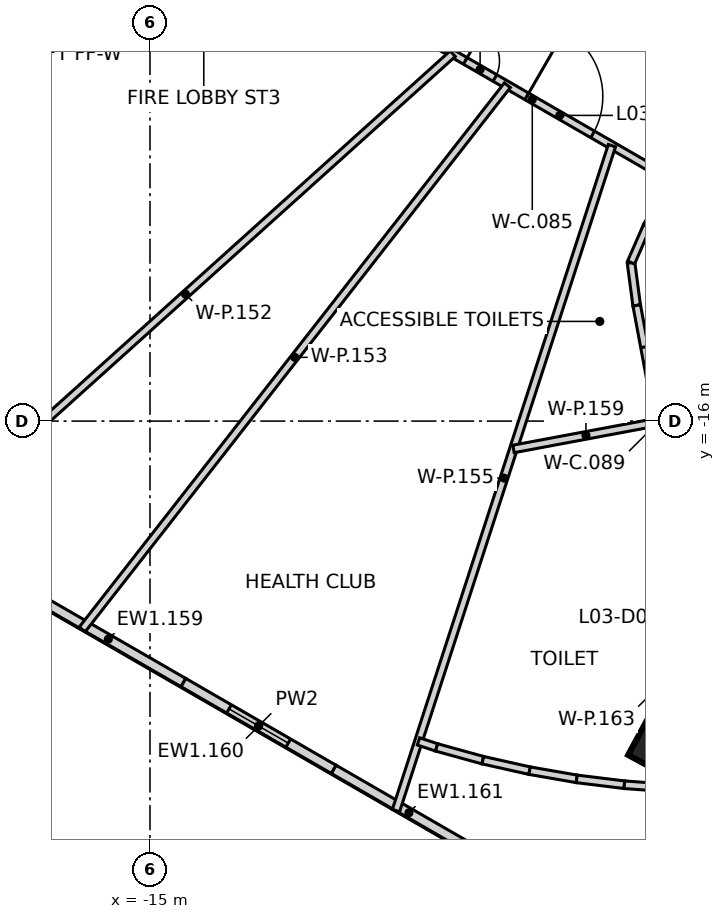
"""IFC4 building model, lengths in metres.
Left out: names, types, materials, properties, quantities, classifications, styles, units other than length and angle.
Written with IfcOpenShell. Run it as: python <this file> out.ifc"""

import sys

from ifc_helpers import new_model, si_unit, direction, frame, frame_2d, origin, origin_2d, place, context, subcontext, project, spatial, rectangle, extrude, element, fill, save


model = new_model("IFC4")
c1 = context("Model", 3, precision=1e-05, world=origin(), true_north=direction((0.0, 1.0)))
c2 = subcontext(c1, "Body", "Model", "MODEL_VIEW")
j1 = project(units=[si_unit("LENGTHUNIT", "METRE"), si_unit("PLANEANGLEUNIT", "RADIAN")], contexts=[c1])
p1 = place(None, origin())
s1 = spatial("IfcSite", under=j1, at=p1, CompositionType="ELEMENT")
p2 = place(p1, origin())
s2 = spatial("IfcBuilding", under=s1, at=p2, CompositionType="ELEMENT")
p3 = place(p2, frame((0.0, 0.0, 19.5)))
s3 = spatial("IfcBuildingStorey", under=s2, at=p3, CompositionType="ELEMENT", Elevation=19.5)
p4 = place(p3, frame((-1.197, -24.423, -0.35), z_axis=(0.0, 0.0, 1.0), x_axis=(0.476198301069, 0.879337920289, 0.0)))
e1 = element("IfcColumn", 1, at=p4, inside=s3, PredefinedType="COLUMN", context=c2, shape_type="SweptSolid", body=[
    extrude(rectangle(XDim=1.8, YDim=1.8, at=origin_2d()), origin(), (0.0, 0.0, 1.0), 2.5),
])
p5 = place(p3, frame((-14.119, -22.881, 0.0), z_axis=(0.0, 0.0, 1.0), x_axis=(-0.866023543838, 0.500003221507, 0.0)))
e2 = element("IfcWall", 2, at=p5, inside=s3, PredefinedType="SOLIDWALL", context=c2, shape_type="SweptSolid", body=[
    extrude(rectangle(XDim=4.566, YDim=0.25, at=frame_2d((2.283, 0.0))), origin(), (0.0, 0.0, 1.0), 4.55),
])
p6 = place(p3, frame((-10.165, -25.164, 0.0), z_axis=(0.0, 0.0, 1.0), x_axis=(-0.866023543838, 0.500003221507, 0.0)))
e3 = element("IfcWall", 3, at=p6, inside=s3, PredefinedType="SOLIDWALL", context=c2, shape_type="SweptSolid", body=[
    extrude(rectangle(XDim=4.566, YDim=0.25, at=frame_2d((2.283, 0.0))), origin(), (0.0, 0.0, 1.0), 4.55),
])
p7 = place(p6, frame((1.383, 0.0, 1.1)))
e4 = element("IfcOpeningElement", 4, at=p7, cuts=e3, PredefinedType="OPENING", context=c2, shape_type="SweptSolid", body=[
    extrude(rectangle(XDim=1.8, YDim=1.5, at=frame_2d((0.9, 0.75))), frame((0.0, 0.135, 0.0), z_axis=(0.0, -1.0, 0.0), x_axis=(1.0, 0.0, 0.0)), (0.0, 0.0, 1.0), 0.27),
])
p8 = place(p3, frame((-6.21, -27.447, 0.0), z_axis=(0.0, 0.0, 1.0), x_axis=(-0.866046694585, 0.499963121439, 0.0)))
e5 = element("IfcWall", 5, at=p8, inside=s3, PredefinedType="SOLIDWALL", context=c2, shape_type="SweptSolid", body=[
    extrude(rectangle(XDim=4.566, YDim=0.25, at=frame_2d((2.283, 0.0))), origin(), (0.0, 0.0, 1.0), 4.55),
])
p9 = place(p3, frame((-8.636, -5.407, 0.0), z_axis=(0.0, 0.0, 1.0), x_axis=(0.86608314541, -0.499899975231, 0.0)))
e6 = element("IfcWall", 6, at=p9, inside=s3, PredefinedType="PARTITIONING", context=c2, shape_type="SweptSolid", body=[
    extrude(rectangle(XDim=8.532, YDim=0.2, at=frame_2d((4.266, 0.0))), origin(), (0.0, 0.0, 1.0), 4.55),
])
p10 = place(p9, frame((2.231, 0.0, 0.0)))
e7 = element("IfcOpeningElement", 7, at=p10, cuts=e6, PredefinedType="OPENING", context=c2, shape_type="SweptSolid", body=[
    extrude(rectangle(XDim=0.9, YDim=2.1, at=frame_2d((0.45, 1.05))), frame((0.0, 0.11, 0.0), z_axis=(0.0, -1.0, 0.0), x_axis=(1.0, 0.0, 0.0)), (0.0, 0.0, 1.0), 0.22),
])
p11 = place(p9, frame((4.101, 0.0, 0.0)))
e8 = element("IfcOpeningElement", 8, at=p11, cuts=e6, PredefinedType="OPENING", context=c2, shape_type="SweptSolid", body=[
    extrude(rectangle(XDim=2.0, YDim=2.1, at=frame_2d((1.0, 1.05))), frame((0.0, 0.11, 0.0), z_axis=(0.0, -1.0, 0.0), x_axis=(1.0, 0.0, 0.0)), (0.0, 0.0, 1.0), 0.22),
])
p12 = place(p3, frame((-2.342, -11.835, 0.0), z_axis=(0.0, 0.0, 1.0), x_axis=(0.130834272089, -0.991404253192, 0.0)))
e9 = element("IfcWall", 9, at=p12, inside=s3, PredefinedType="PARTITIONING", context=c2, shape_type="SweptSolid", body=[
    extrude(rectangle(XDim=1.131, YDim=0.2, at=frame_2d((0.565, 0.0))), origin(), (0.0, 0.0, 1.0), 4.55),
])
p13 = place(p3, frame((-2.341, -11.827, 0.0), z_axis=(0.0, 0.0, 1.0), x_axis=(0.400116595296, 0.916464243803, 0.0)))
e10 = element("IfcWall", 10, at=p13, inside=s3, PredefinedType="PARTITIONING", context=c2, shape_type="SweptSolid", body=[
    extrude(rectangle(XDim=1.04, YDim=0.2, at=frame_2d((0.52, 0.0))), origin(), (0.0, 0.0, 1.0), 4.55),
])
p14 = place(p3, frame((-2.193, -12.956, 0.0), z_axis=(0.0, 0.0, 1.0), x_axis=(0.183666249042, -0.982988661665, 0.0)))
e11 = element("IfcWall", 11, at=p14, inside=s3, PredefinedType="PARTITIONING", context=c2, shape_type="SweptSolid", body=[
    extrude(rectangle(XDim=6.23, YDim=0.2, at=frame_2d((3.115, 0.0))), origin(), (0.0, 0.0, 1.0), 4.55),
])
p15 = place(p14, frame((4.268, 0.0, 0.0)))
e12 = element("IfcOpeningElement", 12, at=p15, cuts=e11, PredefinedType="OPENING", context=c2, shape_type="SweptSolid", body=[
    extrude(rectangle(XDim=0.8, YDim=2.1, at=frame_2d((0.4, 1.05))), frame((0.0, 0.11, 0.0), z_axis=(0.0, -1.0, 0.0), x_axis=(1.0, 0.0, 0.0)), (0.0, 0.0, 1.0), 0.22),
])
p16 = place(p14, frame((1.114, 0.0, 0.0)))
e13 = element("IfcOpeningElement", 13, at=p16, cuts=e11, PredefinedType="OPENING", context=c2, shape_type="SweptSolid", body=[
    extrude(rectangle(XDim=0.9, YDim=2.1, at=frame_2d((0.45, 1.05))), frame((0.0, 0.11, 0.0), z_axis=(0.0, -1.0, 0.0), x_axis=(1.0, 0.0, 0.0)), (0.0, 0.0, 1.0), 0.22),
])
p17 = place(p3, frame((-1.924, -10.869, 0.0), z_axis=(0.0, 0.0, 1.0), x_axis=(0.499136241111, 0.866523521209, 0.0)))
e14 = element("IfcWall", 14, at=p17, inside=s3, PredefinedType="PARTITIONING", context=c2, shape_type="SweptSolid", body=[
    extrude(rectangle(XDim=1.358, YDim=0.2, at=frame_2d((0.679, 0.0))), origin(), (0.0, 0.0, 1.0), 4.55),
])
p18 = place(p3, frame((-21.094, -18.993, 0.0), z_axis=(0.0, 0.0, 1.0), x_axis=(0.743122161884, 0.669155775972, 0.0)))
e15 = element("IfcWall", 15, at=p18, inside=s3, PredefinedType="PARTITIONING", context=c2, shape_type="SweptSolid", body=[
    extrude(rectangle(XDim=18.92, YDim=0.2, at=frame_2d((9.46, 0.0))), origin(), (0.0, 0.0, 1.0), 2.15),
])
p19 = place(p3, frame((-16.783, -21.481, 0.0), z_axis=(0.0, 0.0, 1.0), x_axis=(0.615637784037, 0.788029262696, 0.0)))
e16 = element("IfcWall", 16, at=p19, inside=s3, PredefinedType="PARTITIONING", context=c2, shape_type="SweptSolid", body=[
    extrude(rectangle(XDim=18.17, YDim=0.2, at=frame_2d((9.085, 0.0))), origin(), (0.0, 0.0, 1.0), 2.15),
])
p20 = place(p3, frame((-8.528, -26.248, 0.0), z_axis=(0.0, 0.0, 1.0), x_axis=(0.308912004648, 0.951090623119, 0.0)))
e17 = element("IfcWall", 17, at=p20, inside=s3, PredefinedType="PARTITIONING", context=c2, shape_type="SweptSolid", body=[
    extrude(rectangle(XDim=18.395, YDim=0.2, at=frame_2d((9.197, 0.0))), origin(), (0.0, 0.0, 1.0), 2.15),
])
p21 = place(p3, frame((-7.935, -24.428, 0.0), z_axis=(0.0, 0.0, 1.0), x_axis=(0.949312985708, -0.314332395984, 0.0)))
e18 = element("IfcWall", 18, at=p21, inside=s3, PredefinedType="PARTITIONING", context=c2, shape_type="SweptSolid", body=[
    extrude(rectangle(XDim=0.502, YDim=0.2, at=frame_2d((0.251, 0.0))), origin(), (0.0, 0.0, 1.0), 4.55),
])
p22 = place(p3, frame((-7.458, -24.586, 0.0), z_axis=(0.0, 0.0, 1.0), x_axis=(0.96379206232, -0.266654946718, 0.0)))
e19 = element("IfcWall", 19, at=p22, inside=s3, PredefinedType="PARTITIONING", context=c2, shape_type="SweptSolid", body=[
    extrude(rectangle(XDim=1.261, YDim=0.2, at=frame_2d((0.63, 0.0))), origin(), (0.0, 0.0, 1.0), 4.55),
])
p23 = place(p3, frame((-6.243, -24.922, 0.0), z_axis=(0.0, 0.0, 1.0), x_axis=(0.975793849567, -0.218692393893, 0.0)))
e20 = element("IfcWall", 20, at=p23, inside=s3, PredefinedType="PARTITIONING", context=c2, shape_type="SweptSolid", body=[
    extrude(rectangle(XDim=1.261, YDim=0.2, at=frame_2d((0.631, 0.0))), origin(), (0.0, 0.0, 1.0), 4.55),
])
p24 = place(p3, frame((-5.435, -16.733, 0.0), z_axis=(0.0, 0.0, 1.0), x_axis=(0.982959024913, 0.183824795232, 0.0)))
e21 = element("IfcWall", 21, at=p24, inside=s3, PredefinedType="PARTITIONING", context=c2, shape_type="SweptSolid", body=[
    extrude(rectangle(XDim=3.878, YDim=0.2, at=frame_2d((1.939, 0.0))), origin(), (0.0, 0.0, 1.0), 4.55),
])
p25 = place(p3, frame((-5.012, -25.198, 0.0), z_axis=(0.0, 0.0, 1.0), x_axis=(0.985201803115, -0.171398387214, 0.0)))
e22 = element("IfcWall", 22, at=p25, inside=s3, PredefinedType="PARTITIONING", context=c2, shape_type="SweptSolid", body=[
    extrude(rectangle(XDim=1.26, YDim=0.2, at=frame_2d((0.63, 0.0))), origin(), (0.0, 0.0, 1.0), 4.55),
])
p26 = place(p3, frame((-3.77, -25.414, 0.0), z_axis=(0.0, 0.0, 1.0), x_axis=(0.992514259678, -0.122128802234, 0.0)))
e23 = element("IfcWall", 23, at=p26, inside=s3, PredefinedType="PARTITIONING", context=c2, shape_type="SweptSolid", body=[
    extrude(rectangle(XDim=1.261, YDim=0.2, at=frame_2d((0.631, 0.0))), origin(), (0.0, 0.0, 1.0), 4.55),
])
p27 = place(p3, frame((-2.518, -25.568, 0.0), z_axis=(0.0, 0.0, 1.0), x_axis=(0.997287799619, -0.073600575618, 0.0)))
e24 = element("IfcWall", 24, at=p27, inside=s3, PredefinedType="PARTITIONING", context=c2, shape_type="SweptSolid", body=[
    extrude(rectangle(XDim=1.26, YDim=0.2, at=frame_2d((0.63, 0.0))), origin(), (0.0, 0.0, 1.0), 4.55),
])
p28 = place(p7, origin())
e25 = element("IfcWindow", 25, at=p28, inside=s3, PartitioningType="SINGLE_PANEL", PredefinedType="WINDOW", context=c2, shape_type="SweptSolid", body=[
    extrude(rectangle(XDim=1.8, YDim=1.5, at=frame_2d((0.9, 0.75))), frame((0.0, 0.03, 0.0), z_axis=(0.0, -1.0, 0.0), x_axis=(1.0, 0.0, 0.0)), (0.0, 0.0, 1.0), 0.06),
])
fill(e4, e25)
p29 = place(p10, frame((0.9, 0.0, 0.0), z_axis=(0.0, 0.0, 1.0), x_axis=(-1.0, 0.0, 0.0)))
e26 = element("IfcDoor", 26, at=p29, inside=s3, OperationType="SINGLE_SWING_LEFT", PredefinedType="DOOR", context=c2, shape_type="SweptSolid", body=[
    extrude(rectangle(XDim=0.9, YDim=2.1, at=frame_2d((0.45, 1.05))), frame((0.0, 0.025, 0.0), z_axis=(0.0, -1.0, 0.0), x_axis=(1.0, 0.0, 0.0)), (0.0, 0.0, 1.0), 0.05),
])
fill(e7, e26)
p30 = place(p11, frame((2.0, 0.0, 0.0), z_axis=(0.0, 0.0, 1.0), x_axis=(-1.0, 0.0, 0.0)))
e27 = element("IfcDoor", 27, at=p30, inside=s3, OperationType="DOUBLE_DOOR_SINGLE_SWING", PredefinedType="DOOR", context=c2, shape_type="SweptSolid", body=[
    extrude(rectangle(XDim=2.0, YDim=2.1, at=frame_2d((1.0, 1.05))), frame((0.0, 0.025, 0.0), z_axis=(0.0, -1.0, 0.0), x_axis=(1.0, 0.0, 0.0)), (0.0, 0.0, 1.0), 0.05),
])
fill(e8, e27)
p31 = place(p16, frame((0.9, 0.0, 0.0), z_axis=(0.0, 0.0, 1.0), x_axis=(-1.0, 0.0, 0.0)))
e28 = element("IfcDoor", 28, at=p31, inside=s3, OperationType="SINGLE_SWING_LEFT", PredefinedType="DOOR", context=c2, shape_type="SweptSolid", body=[
    extrude(rectangle(XDim=0.9, YDim=2.1, at=frame_2d((0.45, 1.05))), frame((0.0, 0.025, 0.0), z_axis=(0.0, -1.0, 0.0), x_axis=(1.0, 0.0, 0.0)), (0.0, 0.0, 1.0), 0.05),
])
fill(e13, e28)
save(model, sys.argv[1])
